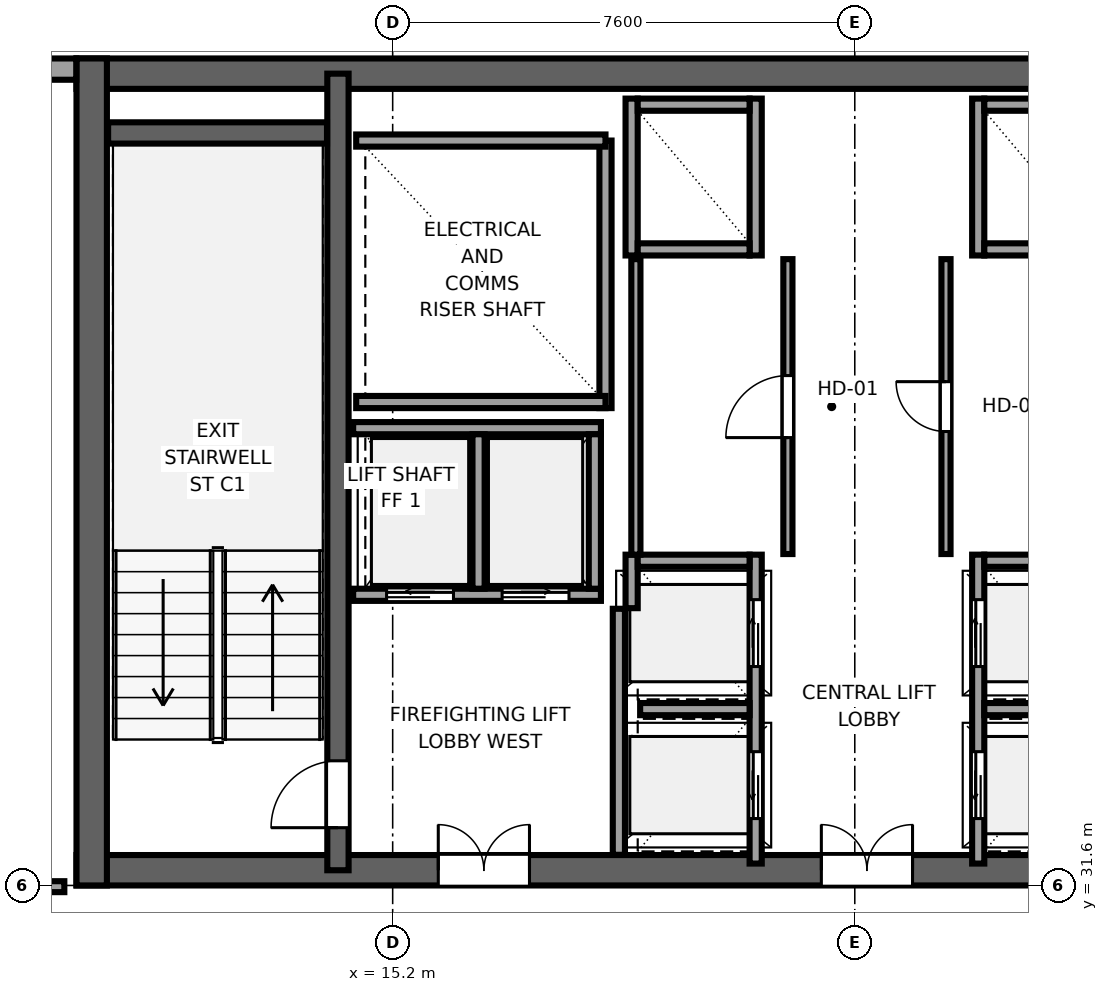
"""IFC4 building model, lengths in metres.
Left out: names, types, materials, properties, quantities, classifications, styles, units other than length and angle.
Written with IfcOpenShell. Run it as: python <this file> out.ifc"""

import sys

from ifc_helpers import new_model, si_unit, direction, frame, frame_2d, origin, place, context, subcontext, project, spatial, rectangle, extrude, source, transform, mapped, element, fill, save


model = new_model("IFC4")
c1 = context("Model", 3, precision=1e-05, world=origin(), true_north=direction((0.0, 1.0)))
c2 = subcontext(c1, "Body", "Model", "MODEL_VIEW")
j1 = project(units=[si_unit("LENGTHUNIT", "METRE"), si_unit("PLANEANGLEUNIT", "RADIAN")], contexts=[c1])
p1 = place(None, origin())
s1 = spatial("IfcSite", under=j1, at=p1, CompositionType="ELEMENT")
p2 = place(p1, origin())
s2 = spatial("IfcBuilding", under=s1, at=p2, CompositionType="ELEMENT")
p3 = place(p2, frame((0.0, 0.0, 248.75)))
s3 = spatial("IfcBuildingStorey", under=s2, at=p3, CompositionType="ELEMENT", Elevation=248.75)
p4 = place(p3, frame((10.0, 31.85, 0.0), z_axis=(0.0, 0.0, 1.0), x_axis=(1.0, 0.0, 0.0)))
e1 = element("IfcWall", 1, at=p4, inside=s3, PredefinedType="SHEAR", context=c2, shape_type="SweptSolid", body=[
    extrude(rectangle(XDim=26.0, YDim=0.5, at=frame_2d((13.0, 0.0))), origin(), (0.0, 0.0, 1.0), 3.55),
])
p5 = place(p4, frame((7.45, 0.0, 0.0), z_axis=(0.0, 0.0, 1.0), x_axis=(-1.0, 0.0, 0.0)))
e2 = element("IfcOpeningElement", 2, at=p5, cuts=e1, PredefinedType="OPENING", context=c2, shape_type="SweptSolid", body=[
    extrude(rectangle(XDim=1.5, YDim=2.04, at=frame_2d((0.75, 1.02))), frame((0.0, 0.26, 0.0), z_axis=(0.0, -1.0, 0.0), x_axis=(1.0, 0.0, 0.0)), (0.0, 0.0, 1.0), 0.52),
])
p6 = place(p4, frame((13.75, 0.0, 0.0), z_axis=(0.0, 0.0, 1.0), x_axis=(-1.0, 0.0, 0.0)))
e3 = element("IfcOpeningElement", 3, at=p6, cuts=e1, PredefinedType="OPENING", context=c2, shape_type="SweptSolid", body=[
    extrude(rectangle(XDim=1.5, YDim=2.04, at=frame_2d((0.75, 1.02))), frame((0.0, 0.26, 0.0), z_axis=(0.0, -1.0, 0.0), x_axis=(1.0, 0.0, 0.0)), (0.0, 0.0, 1.0), 0.52),
])
p7 = place(p4, frame((20.05, 0.0, 0.0), z_axis=(0.0, 0.0, 1.0), x_axis=(-1.0, 0.0, 0.0)))
e4 = element("IfcOpeningElement", 4, at=p7, cuts=e1, PredefinedType="OPENING", context=c2, shape_type="SweptSolid", body=[
    extrude(rectangle(XDim=1.5, YDim=2.04, at=frame_2d((0.75, 1.02))), frame((0.0, 0.26, 0.0), z_axis=(0.0, -1.0, 0.0), x_axis=(1.0, 0.0, 0.0)), (0.0, 0.0, 1.0), 0.52),
])
p8 = place(p3, frame((10.0, 44.95, 0.0), z_axis=(0.0, 0.0, 1.0), x_axis=(1.0, 0.0, 0.0)))
e5 = element("IfcWall", 5, at=p8, inside=s3, PredefinedType="SHEAR", context=c2, shape_type="SweptSolid", body=[
    extrude(rectangle(XDim=26.0, YDim=0.5, at=frame_2d((13.0, 0.0))), origin(), (0.0, 0.0, 1.0), 3.55),
])
p9 = place(p3, frame((10.25, 31.6, 0.0), z_axis=(0.0, 0.0, 1.0), x_axis=(0.0, 1.0, 0.0)))
e6 = element("IfcWall", 6, at=p9, inside=s3, PredefinedType="SHEAR", context=c2, shape_type="SweptSolid", body=[
    extrude(rectangle(XDim=13.6, YDim=0.5, at=frame_2d((6.8, 0.0))), origin(), (0.0, 0.0, 1.0), 3.55),
])
p10 = place(p3, frame((14.3, 31.85, 0.0), z_axis=(0.0, 0.0, 1.0), x_axis=(0.0, 1.0, 0.0)))
e7 = element("IfcWall", 7, at=p10, inside=s3, PredefinedType="SHEAR", context=c2, shape_type="SweptSolid", body=[
    extrude(rectangle(XDim=13.1, YDim=0.35, at=frame_2d((6.55, 0.0))), origin(), (0.0, 0.0, 1.0), 3.55),
])
p11 = place(p10, frame((0.7, 0.0, 0.0)))
e8 = element("IfcOpeningElement", 8, at=p11, cuts=e7, PredefinedType="OPENING", context=c2, shape_type="SweptSolid", body=[
    extrude(rectangle(XDim=1.1, YDim=2.12, at=frame_2d((0.55, 1.06))), frame((0.0, 0.185, 0.0), z_axis=(0.0, -1.0, 0.0), x_axis=(1.0, 0.0, 0.0)), (0.0, 0.0, 1.0), 0.37),
])
p12 = place(p3, frame((10.52, 43.975, 0.0), z_axis=(0.0, 0.0, 1.0), x_axis=(1.0, 0.0, 0.0)))
e9 = element("IfcWall", 9, at=p12, inside=s3, PredefinedType="SHEAR", context=c2, shape_type="SweptSolid", body=[
    extrude(rectangle(XDim=3.6, YDim=0.35, at=frame_2d((1.8, 0.0))), origin(), (0.0, 0.0, 1.0), 3.55),
])
p13 = place(p3, frame((9.996, 45.025, 0.0), z_axis=(0.0, 0.0, 1.0), x_axis=(-1.0, 0.0, 0.0)))
e10 = element("IfcWall", 10, at=p13, inside=s3, PredefinedType="SOLIDWALL", context=c2, shape_type="SweptSolid", body=[
    extrude(rectangle(XDim=2.979, YDim=0.35, at=frame_2d((1.49, 0.0))), origin(), (0.0, 0.0, 1.0), 2.16),
])
p14 = place(p3, frame((18.7, 39.45, 0.0), z_axis=(0.0, 0.0, 1.0), x_axis=(0.0, 1.0, 0.0)))
e11 = element("IfcWall", 11, at=p14, inside=s3, PredefinedType="SOLIDWALL", context=c2, shape_type="SweptSolid", body=[
    extrude(rectangle(XDim=4.4, YDim=0.2, at=frame_2d((2.2, 0.0))), origin(), (0.0, 0.0, 1.0), 3.37),
])
for number, where, z_axis, x_axis in (
    (12, (14.6, 39.55, 0.0), (0.0, 0.0, 1.0), (1.0, 0.0, 0.0)),
    (13, (14.6, 43.85, 0.0), (0.0, 0.0, 1.0), (1.0, 0.0, 0.0)),
):
    element("IfcWall", number, at=place(p3, frame(where, z_axis=z_axis, x_axis=x_axis)), inside=s3, PredefinedType="SOLIDWALL", context=c2, shape_type="SweptSolid", body=[
        extrude(rectangle(XDim=4.1, YDim=0.2, at=frame_2d((2.05, 0.0))), origin(), (0.0, 0.0, 1.0), 3.37),
    ])
p15 = place(p3, frame((18.92, 32.104, 0.0), z_axis=(0.0, 0.0, 1.0), x_axis=(0.0, 1.0, 0.0)))
e14 = element("IfcWall", 14, at=p15, inside=s3, PredefinedType="SOLIDWALL", context=c2, shape_type="SweptSolid", body=[
    extrude(rectangle(XDim=4.046, YDim=0.2, at=frame_2d((2.023, 0.0))), origin(), (0.0, 0.0, 1.0), 3.37),
])
p16 = place(p3, frame((21.17, 31.96, 0.0), z_axis=(0.0, 0.0, 1.0), x_axis=(0.0, 1.0, 0.0)))
e15 = element("IfcWall", 15, at=p16, inside=s3, PredefinedType="SOLIDWALL", context=c2, shape_type="SweptSolid", body=[
    extrude(rectangle(XDim=5.08, YDim=0.2, at=frame_2d((2.54, 0.0))), origin(), (0.0, 0.0, 1.0), 3.37),
])
p17 = place(p16, frame((0.74, 0.0, 0.0)))
e16 = element("IfcOpeningElement", 16, at=p17, cuts=e15, PredefinedType="OPENING", context=c2, shape_type="SweptSolid", body=[
    extrude(rectangle(XDim=1.1, YDim=2.12, at=frame_2d((0.55, 1.06))), frame((0.0, 0.11, 0.0), z_axis=(0.0, -1.0, 0.0), x_axis=(1.0, 0.0, 0.0)), (0.0, 0.0, 1.0), 0.22),
])
p18 = place(p16, frame((3.24, 0.0, 0.0)))
e17 = element("IfcOpeningElement", 17, at=p18, cuts=e15, PredefinedType="OPENING", context=c2, shape_type="SweptSolid", body=[
    extrude(rectangle(XDim=1.1, YDim=2.12, at=frame_2d((0.55, 1.06))), frame((0.0, 0.11, 0.0), z_axis=(0.0, -1.0, 0.0), x_axis=(1.0, 0.0, 0.0)), (0.0, 0.0, 1.0), 0.22),
])
p19 = place(p3, frame((19.13, 36.16, 0.0), z_axis=(0.0, 0.0, 1.0), x_axis=(0.0, 1.0, 0.0)))
e18 = element("IfcWall", 18, at=p19, inside=s3, PredefinedType="SOLIDWALL", context=c2, shape_type="SweptSolid", body=[
    extrude(rectangle(XDim=0.88, YDim=0.2, at=frame_2d((0.44, 0.0))), origin(), (0.0, 0.0, 1.0), 3.37),
])
p20 = place(p3, frame((19.23, 36.94, 0.0), z_axis=(0.0, 0.0, 1.0), x_axis=(1.0, 0.0, 0.0)))
e19 = element("IfcWall", 19, at=p20, inside=s3, PredefinedType="SOLIDWALL", context=c2, shape_type="SweptSolid", body=[
    extrude(rectangle(XDim=1.84, YDim=0.2, at=frame_2d((0.92, 0.0))), origin(), (0.0, 0.0, 1.0), 3.37),
])
p21 = place(p3, frame((19.27, 34.5, 0.0), z_axis=(0.0, 0.0, 1.0), x_axis=(1.0, 0.0, 0.0)))
e20 = element("IfcWall", 20, at=p21, inside=s3, PredefinedType="SOLIDWALL", context=c2, shape_type="SweptSolid", body=[
    extrude(rectangle(XDim=1.8, YDim=0.2, at=frame_2d((0.9, 0.0))), origin(), (0.0, 0.0, 1.0), 3.37),
])
for number, where, z_axis, x_axis in (
    (21, (21.17, 41.96, 0.0), (0.0, 0.0, 1.0), (0.0, 1.0, 0.0)),
    (22, (19.13, 41.96, 0.0), (0.0, 0.0, 1.0), (0.0, 1.0, 0.0)),
):
    element("IfcWall", number, at=place(p3, frame(where, z_axis=z_axis, x_axis=x_axis)), inside=s3, PredefinedType="SOLIDWALL", context=c2, shape_type="SweptSolid", body=[
        extrude(rectangle(XDim=2.58, YDim=0.2, at=frame_2d((1.29, 0.0))), origin(), (0.0, 0.0, 1.0), 3.37),
    ])
for number, where, z_axis, x_axis in (
    (23, (19.23, 42.06, 0.0), (0.0, 0.0, 1.0), (1.0, 0.0, 0.0)),
    (24, (19.23, 44.44, 0.0), (0.0, 0.0, 1.0), (1.0, 0.0, 0.0)),
):
    element("IfcWall", number, at=place(p3, frame(where, z_axis=z_axis, x_axis=x_axis)), inside=s3, PredefinedType="SOLIDWALL", context=c2, shape_type="SweptSolid", body=[
        extrude(rectangle(XDim=1.84, YDim=0.2, at=frame_2d((0.92, 0.0))), origin(), (0.0, 0.0, 1.0), 3.37),
    ])
p22 = place(p3, frame((14.55, 36.38, 0.0), z_axis=(0.0, 0.0, 1.0), x_axis=(1.0, 0.0, 0.0)))
e25 = element("IfcWall", 25, at=p22, inside=s3, PredefinedType="SOLIDWALL", context=c2, shape_type="SweptSolid", body=[
    extrude(rectangle(XDim=4.075, YDim=0.2, at=frame_2d((2.038, 0.0))), origin(), (0.0, 0.0, 1.0), 3.37),
])
p23 = place(p22, frame((0.55, 0.0, 0.0)))
e26 = element("IfcOpeningElement", 26, at=p23, cuts=e25, PredefinedType="OPENING", context=c2, shape_type="SweptSolid", body=[
    extrude(rectangle(XDim=1.1, YDim=2.12, at=frame_2d((0.55, 1.06))), frame((0.0, 0.11, 0.0), z_axis=(0.0, -1.0, 0.0), x_axis=(1.0, 0.0, 0.0)), (0.0, 0.0, 1.0), 0.22),
])
p24 = place(p22, frame((2.45, 0.0, 0.0)))
e27 = element("IfcOpeningElement", 27, at=p24, cuts=e25, PredefinedType="OPENING", context=c2, shape_type="SweptSolid", body=[
    extrude(rectangle(XDim=1.1, YDim=2.12, at=frame_2d((0.55, 1.06))), frame((0.0, 0.11, 0.0), z_axis=(0.0, -1.0, 0.0), x_axis=(1.0, 0.0, 0.0)), (0.0, 0.0, 1.0), 0.22),
])
p25 = place(p3, frame((14.55, 39.12, 0.0), z_axis=(0.0, 0.0, 1.0), x_axis=(1.0, 0.0, 0.0)))
e28 = element("IfcWall", 28, at=p25, inside=s3, PredefinedType="SOLIDWALL", context=c2, shape_type="SweptSolid", body=[
    extrude(rectangle(XDim=4.075, YDim=0.2, at=frame_2d((2.038, 0.0))), origin(), (0.0, 0.0, 1.0), 3.37),
])
for number, where, z_axis, x_axis in (
    (29, (18.525, 36.48, 0.0), (0.0, 0.0, 1.0), (0.0, 1.0, 0.0)),
    (30, (16.613, 36.48, 0.0), (0.0, 0.0, 1.0), (0.0, 1.0, 0.0)),
):
    element("IfcWall", number, at=place(p3, frame(where, z_axis=z_axis, x_axis=x_axis)), inside=s3, PredefinedType="SOLIDWALL", context=c2, shape_type="SweptSolid", body=[
        extrude(rectangle(XDim=2.54, YDim=0.2, at=frame_2d((1.27, 0.0))), origin(), (0.0, 0.0, 1.0), 3.37),
    ])
p26 = place(p3, frame((24.83, 31.96, 0.0), z_axis=(0.0, 0.0, 1.0), x_axis=(0.0, 1.0, 0.0)))
e31 = element("IfcWall", 31, at=p26, inside=s3, PredefinedType="SOLIDWALL", context=c2, shape_type="SweptSolid", body=[
    extrude(rectangle(XDim=5.08, YDim=0.2, at=frame_2d((2.54, 0.0))), origin(), (0.0, 0.0, 1.0), 3.37),
])
p27 = place(p26, frame((0.74, 0.0, 0.0)))
e32 = element("IfcOpeningElement", 32, at=p27, cuts=e31, PredefinedType="OPENING", context=c2, shape_type="SweptSolid", body=[
    extrude(rectangle(XDim=1.1, YDim=2.12, at=frame_2d((0.55, 1.06))), frame((0.0, 0.11, 0.0), z_axis=(0.0, -1.0, 0.0), x_axis=(1.0, 0.0, 0.0)), (0.0, 0.0, 1.0), 0.22),
])
p28 = place(p26, frame((3.24, 0.0, 0.0)))
e33 = element("IfcOpeningElement", 33, at=p28, cuts=e31, PredefinedType="OPENING", context=c2, shape_type="SweptSolid", body=[
    extrude(rectangle(XDim=1.1, YDim=2.12, at=frame_2d((0.55, 1.06))), frame((0.0, 0.11, 0.0), z_axis=(0.0, -1.0, 0.0), x_axis=(1.0, 0.0, 0.0)), (0.0, 0.0, 1.0), 0.22),
])
p29 = place(p3, frame((24.93, 36.94, 0.0), z_axis=(0.0, 0.0, 1.0), x_axis=(1.0, 0.0, 0.0)))
e34 = element("IfcWall", 34, at=p29, inside=s3, PredefinedType="SOLIDWALL", context=c2, shape_type="SweptSolid", body=[
    extrude(rectangle(XDim=1.84, YDim=0.2, at=frame_2d((0.92, 0.0))), origin(), (0.0, 0.0, 1.0), 3.37),
])
p30 = place(p3, frame((24.93, 34.5, 0.0), z_axis=(0.0, 0.0, 1.0), x_axis=(1.0, 0.0, 0.0)))
e35 = element("IfcWall", 35, at=p30, inside=s3, PredefinedType="SOLIDWALL", context=c2, shape_type="SweptSolid", body=[
    extrude(rectangle(XDim=1.8, YDim=0.2, at=frame_2d((0.9, 0.0))), origin(), (0.0, 0.0, 1.0), 3.37),
])
p31 = place(p3, frame((24.83, 41.96, 0.0), z_axis=(0.0, 0.0, 1.0), x_axis=(0.0, 1.0, 0.0)))
e36 = element("IfcWall", 36, at=p31, inside=s3, PredefinedType="SOLIDWALL", context=c2, shape_type="SweptSolid", body=[
    extrude(rectangle(XDim=2.58, YDim=0.2, at=frame_2d((1.29, 0.0))), origin(), (0.0, 0.0, 1.0), 3.37),
])
for number, where, z_axis, x_axis in (
    (37, (24.93, 42.06, 0.0), (0.0, 0.0, 1.0), (1.0, 0.0, 0.0)),
    (38, (24.93, 44.44, 0.0), (0.0, 0.0, 1.0), (1.0, 0.0, 0.0)),
):
    element("IfcWall", number, at=place(p3, frame(where, z_axis=z_axis, x_axis=x_axis)), inside=s3, PredefinedType="SOLIDWALL", context=c2, shape_type="SweptSolid", body=[
        extrude(rectangle(XDim=1.84, YDim=0.2, at=frame_2d((0.92, 0.0))), origin(), (0.0, 0.0, 1.0), 3.37),
    ])
p32 = place(p3, frame((21.7, 37.05, 0.0), z_axis=(0.0, 0.0, 1.0), x_axis=(0.0, 1.0, 0.0)))
e39 = element("IfcWall", 39, at=p32, inside=s3, PredefinedType="PARTITIONING", context=c2, shape_type="SweptSolid", body=[
    extrude(rectangle(XDim=4.85, YDim=0.15, at=frame_2d((2.425, 0.0))), origin(), (0.0, 0.0, 1.0), 3.37),
])
p33 = place(p32, frame((1.915, 0.0, 0.0)))
e40 = element("IfcOpeningElement", 40, at=p33, cuts=e39, PredefinedType="OPENING", context=c2, shape_type="SweptSolid", body=[
    extrude(rectangle(XDim=1.02, YDim=2.03, at=frame_2d((0.51, 1.015))), frame((0.0, 0.085, 0.0), z_axis=(0.0, -1.0, 0.0), x_axis=(1.0, 0.0, 0.0)), (0.0, 0.0, 1.0), 0.17),
])
p34 = place(p3, frame((19.2, 37.04, 0.0), z_axis=(0.0, 0.0, 1.0), x_axis=(0.0, 1.0, 0.0)))
e41 = element("IfcWall", 41, at=p34, inside=s3, PredefinedType="PARTITIONING", context=c2, shape_type="SweptSolid", body=[
    extrude(rectangle(XDim=4.86, YDim=0.15, at=frame_2d((2.43, 0.0))), origin(), (0.0, 0.0, 1.0), 3.37),
])
p35 = place(p3, frame((24.3, 37.05, 0.0), z_axis=(0.0, 0.0, 1.0), x_axis=(0.0, 1.0, 0.0)))
e42 = element("IfcWall", 42, at=p35, inside=s3, PredefinedType="PARTITIONING", context=c2, shape_type="SweptSolid", body=[
    extrude(rectangle(XDim=4.85, YDim=0.15, at=frame_2d((2.425, 0.0))), origin(), (0.0, 0.0, 1.0), 3.37),
])
p36 = place(p35, frame((2.015, 0.0, 0.0)))
e43 = element("IfcOpeningElement", 43, at=p36, cuts=e42, PredefinedType="OPENING", context=c2, shape_type="SweptSolid", body=[
    extrude(rectangle(XDim=0.82, YDim=2.01, at=frame_2d((0.41, 1.005))), frame((0.0, 0.085, 0.0), z_axis=(0.0, -1.0, 0.0), x_axis=(1.0, 0.0, 0.0)), (0.0, 0.0, 1.0), 0.17),
])
p37 = place(p3, frame((3.005, 31.58, 0.0), z_axis=(0.0, 0.0, 1.0), x_axis=(1.0, 0.0, 0.0)))
e44 = element("IfcWall", 44, at=p37, inside=s3, PredefinedType="PARTITIONING", context=c2, shape_type="SweptSolid", body=[
    extrude(rectangle(XDim=6.795, YDim=0.18, at=frame_2d((3.397, 0.0))), origin(), (0.0, 0.0, 1.0), 3.37),
])
p38 = place(p37, frame((0.285, 0.0, 0.0)))
e45 = element("IfcOpeningElement", 45, at=p38, cuts=e44, PredefinedType="OPENING", context=c2, shape_type="SweptSolid", body=[
    extrude(rectangle(XDim=0.98, YDim=2.12, at=frame_2d((0.49, 1.06))), frame((0.0, 0.1, 0.0), z_axis=(0.0, -1.0, 0.0), x_axis=(1.0, 0.0, 0.0)), (0.0, 0.0, 1.0), 0.2),
])
m1 = source(origin(), c2, "Body", "SweptSolid", [
    extrude(rectangle(XDim=1.1, YDim=2.12, at=frame_2d((0.55, 1.06))), frame((0.0, 0.025, 0.0), z_axis=(0.0, -1.0, 0.0), x_axis=(1.0, 0.0, 0.0)), (0.0, 0.0, 1.0), 0.05),
])
p39 = place(p11, origin())
e46 = element("IfcDoor", 46, at=p39, inside=s3, OperationType="SINGLE_SWING_LEFT", PredefinedType="DOOR", context=c2, shape_type="MappedRepresentation", body=[
    mapped(m1, transform((0.0, 0.0, 0.0), x_axis=(1.0, 0.0, 0.0), y_axis=(0.0, 1.0, 0.0), z_axis=(0.0, 0.0, 1.0), scale=1.0)),
])
fill(e8, e46)
m2 = source(origin(), c2, "Body", "SweptSolid", [
    extrude(rectangle(XDim=1.5, YDim=2.04, at=frame_2d((0.75, 1.02))), frame((0.0, 0.025, 0.0), z_axis=(0.0, -1.0, 0.0), x_axis=(1.0, 0.0, 0.0)), (0.0, 0.0, 1.0), 0.05),
])
p40 = place(p5, origin())
e47 = element("IfcDoor", 47, at=p40, inside=s3, OperationType="DOUBLE_DOOR_SINGLE_SWING", PredefinedType="DOOR", context=c2, shape_type="MappedRepresentation", body=[
    mapped(m2, transform((0.0, 0.0, 0.0), x_axis=(1.0, 0.0, 0.0), y_axis=(0.0, 1.0, 0.0), z_axis=(0.0, 0.0, 1.0), scale=1.0)),
])
fill(e2, e47)
p41 = place(p6, origin())
e48 = element("IfcDoor", 48, at=p41, inside=s3, OperationType="DOUBLE_DOOR_SINGLE_SWING", PredefinedType="DOOR", context=c2, shape_type="MappedRepresentation", body=[
    mapped(m2, transform((0.0, 0.0, 0.0), x_axis=(1.0, 0.0, 0.0), y_axis=(0.0, 1.0, 0.0), z_axis=(0.0, 0.0, 1.0), scale=1.0)),
])
fill(e3, e48)
m3 = source(origin(), c2, "Body", "SweptSolid", [
    extrude(rectangle(XDim=1.1, YDim=2.12, at=frame_2d((0.55, 1.06))), frame((0.0, 0.025, 0.0), z_axis=(0.0, -1.0, 0.0), x_axis=(1.0, 0.0, 0.0)), (0.0, 0.0, 1.0), 0.05),
])
p42 = place(p17, origin())
e49 = element("IfcDoor", 49, at=p42, inside=s3, OperationType="SLIDING_TO_LEFT", PredefinedType="DOOR", context=c2, shape_type="MappedRepresentation", body=[
    mapped(m3, transform((0.0, 0.0, 0.0), x_axis=(1.0, 0.0, 0.0), y_axis=(0.0, 1.0, 0.0), z_axis=(0.0, 0.0, 1.0), scale=1.0)),
])
fill(e16, e49)
p43 = place(p18, origin())
e50 = element("IfcDoor", 50, at=p43, inside=s3, OperationType="SLIDING_TO_RIGHT", PredefinedType="DOOR", context=c2, shape_type="MappedRepresentation", body=[
    mapped(m3, transform((0.0, 0.0, 0.0), x_axis=(1.0, 0.0, 0.0), y_axis=(0.0, 1.0, 0.0), z_axis=(0.0, 0.0, 1.0), scale=1.0)),
])
fill(e17, e50)
p44 = place(p23, origin())
e51 = element("IfcDoor", 51, at=p44, inside=s3, OperationType="SLIDING_TO_LEFT", PredefinedType="DOOR", context=c2, shape_type="MappedRepresentation", body=[
    mapped(m3, transform((0.0, 0.0, 0.0), x_axis=(1.0, 0.0, 0.0), y_axis=(0.0, 1.0, 0.0), z_axis=(0.0, 0.0, 1.0), scale=1.0)),
])
fill(e26, e51)
p45 = place(p24, origin())
e52 = element("IfcDoor", 52, at=p45, inside=s3, OperationType="SLIDING_TO_RIGHT", PredefinedType="DOOR", context=c2, shape_type="MappedRepresentation", body=[
    mapped(m3, transform((0.0, 0.0, 0.0), x_axis=(1.0, 0.0, 0.0), y_axis=(0.0, 1.0, 0.0), z_axis=(0.0, 0.0, 1.0), scale=1.0)),
])
fill(e27, e52)
p46 = place(p27, origin())
e53 = element("IfcDoor", 53, at=p46, inside=s3, OperationType="SLIDING_TO_LEFT", PredefinedType="DOOR", context=c2, shape_type="MappedRepresentation", body=[
    mapped(m3, transform((0.0, 0.0, 0.0), x_axis=(1.0, 0.0, 0.0), y_axis=(0.0, 1.0, 0.0), z_axis=(0.0, 0.0, 1.0), scale=1.0)),
])
fill(e32, e53)
p47 = place(p28, origin())
e54 = element("IfcDoor", 54, at=p47, inside=s3, OperationType="SLIDING_TO_RIGHT", PredefinedType="DOOR", context=c2, shape_type="MappedRepresentation", body=[
    mapped(m3, transform((0.0, 0.0, 0.0), x_axis=(1.0, 0.0, 0.0), y_axis=(0.0, 1.0, 0.0), z_axis=(0.0, 0.0, 1.0), scale=1.0)),
])
fill(e33, e54)
m4 = source(origin(), c2, "Body", "SweptSolid", [
    extrude(rectangle(XDim=1.02, YDim=2.03, at=frame_2d((0.51, 1.015))), frame((0.0, 0.025, 0.0), z_axis=(0.0, -1.0, 0.0), x_axis=(1.0, 0.0, 0.0)), (0.0, 0.0, 1.0), 0.05),
])
p48 = place(p33, origin())
e55 = element("IfcDoor", 55, at=p48, inside=s3, OperationType="SINGLE_SWING_LEFT", PredefinedType="DOOR", context=c2, shape_type="MappedRepresentation", body=[
    mapped(m4, transform((0.0, 0.0, 0.0), x_axis=(1.0, 0.0, 0.0), y_axis=(0.0, 1.0, 0.0), z_axis=(0.0, 0.0, 1.0), scale=1.0)),
])
fill(e40, e55)
m5 = source(origin(), c2, "Body", "SweptSolid", [
    extrude(rectangle(XDim=0.82, YDim=2.01, at=frame_2d((0.41, 1.005))), frame((0.0, 0.025, 0.0), z_axis=(0.0, -1.0, 0.0), x_axis=(1.0, 0.0, 0.0)), (0.0, 0.0, 1.0), 0.05),
])
p49 = place(p36, origin())
e56 = element("IfcDoor", 56, at=p49, inside=s3, OperationType="SINGLE_SWING_RIGHT", PredefinedType="DOOR", context=c2, shape_type="MappedRepresentation", body=[
    mapped(m5, transform((0.0, 0.0, 0.0), x_axis=(1.0, 0.0, 0.0), y_axis=(0.0, 1.0, 0.0), z_axis=(0.0, 0.0, 1.0), scale=1.0)),
])
fill(e43, e56)
save(model, sys.argv[1])
